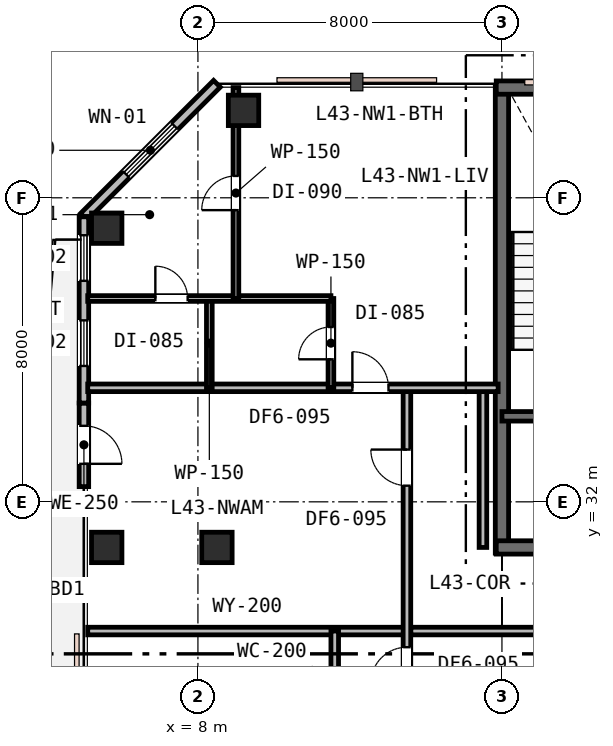
"""IFC4 building model, lengths in metres.
Left out: names, types, materials, properties, quantities, classifications, styles, units other than length and angle.
Written with IfcOpenShell. Run it as: python <this file> out.ifc"""

import sys

from ifc_helpers import new_model, si_unit, direction, frame, frame_2d, origin, origin_2d, place, context, subcontext, project, spatial, rectangle, extrude, element, fill, save


model = new_model("IFC4")
c1 = context("Model", 3, precision=1e-05, world=origin(), true_north=direction((0.0, 1.0)))
c2 = subcontext(c1, "Body", "Model", "MODEL_VIEW")
j1 = project(units=[si_unit("LENGTHUNIT", "METRE"), si_unit("PLANEANGLEUNIT", "RADIAN")], contexts=[c1])
p1 = place(None, origin())
s1 = spatial("IfcSite", under=j1, at=p1, CompositionType="ELEMENT")
p2 = place(p1, origin())
s2 = spatial("IfcBuilding", under=s1, at=p2, CompositionType="ELEMENT")
p3 = place(p2, frame((0.0, 0.0, 168.6)))
s3 = spatial("IfcBuildingStorey", under=s2, at=p3, CompositionType="ELEMENT", Elevation=168.6)
p4 = place(p3, frame((16.0, 30.65, 0.0), z_axis=(0.0, 0.0, 1.0), x_axis=(0.0, 1.0, 0.0)))
e1 = element("IfcWall", 1, at=p4, inside=s3, PredefinedType="SHEAR", context=c2, shape_type="SweptSolid", body=[
    extrude(rectangle(XDim=12.3, YDim=0.35, at=frame_2d((6.15, 0.0))), origin(), (0.0, 0.0, 1.0), 3.6),
])
p5 = place(p3, frame((15.85, 42.9, 0.0), z_axis=(0.0, 0.0, 1.0), x_axis=(1.0, 0.0, 0.0)))
e2 = element("IfcWall", 2, at=p5, inside=s3, PredefinedType="SHEAR", context=c2, shape_type="SweptSolid", body=[
    extrude(rectangle(XDim=24.3, YDim=0.35, at=frame_2d((12.15, 0.0))), origin(), (0.0, 0.0, 1.0), 3.6),
])
p6 = place(p5, frame((1.6, 0.0, 0.95)))
e3 = element("IfcOpeningElement", 3, at=p6, cuts=e2, PredefinedType="OPENING", context=c2, shape_type="SweptSolid", body=[
    extrude(rectangle(XDim=1.2, YDim=1.6, at=frame_2d((0.6, 0.8))), frame((0.0, 0.185, 0.0), z_axis=(0.0, -1.0, 0.0), x_axis=(1.0, 0.0, 0.0)), (0.0, 0.0, 1.0), 0.37),
])
p7 = place(p5, frame((16.5, 0.0, 0.95)))
e4 = element("IfcOpeningElement", 4, at=p7, cuts=e2, PredefinedType="OPENING", context=c2, shape_type="SweptSolid", body=[
    extrude(rectangle(XDim=1.2, YDim=1.6, at=frame_2d((0.6, 0.8))), frame((0.0, 0.185, 0.0), z_axis=(0.0, -1.0, 0.0), x_axis=(1.0, 0.0, 0.0)), (0.0, 0.0, 1.0), 0.37),
])
p8 = place(p5, frame((21.6, 0.0, 0.95)))
e5 = element("IfcOpeningElement", 5, at=p8, cuts=e2, PredefinedType="OPENING", context=c2, shape_type="SweptSolid", body=[
    extrude(rectangle(XDim=1.2, YDim=1.6, at=frame_2d((0.6, 0.8))), frame((0.0, 0.185, 0.0), z_axis=(0.0, -1.0, 0.0), x_axis=(1.0, 0.0, 0.0)), (0.0, 0.0, 1.0), 0.37),
])
p9 = place(p3, frame((15.85, 30.8, 0.0), z_axis=(0.0, 0.0, 1.0), x_axis=(1.0, 0.0, 0.0)))
e6 = element("IfcWall", 6, at=p9, inside=s3, PredefinedType="SHEAR", context=c2, shape_type="SweptSolid", body=[
    extrude(rectangle(XDim=11.2, YDim=0.35, at=frame_2d((5.6, 0.0))), origin(), (0.0, 0.0, 1.0), 3.6),
])
p10 = place(p9, frame((2.45, 0.0, 0.0)))
e7 = element("IfcOpeningElement", 7, at=p10, cuts=e6, PredefinedType="OPENING", context=c2, shape_type="SweptSolid", body=[
    extrude(rectangle(XDim=1.1, YDim=2.15, at=frame_2d((0.55, 1.075))), frame((0.0, 0.185, 0.0), z_axis=(0.0, -1.0, 0.0), x_axis=(1.0, 0.0, 0.0)), (0.0, 0.0, 1.0), 0.37),
])
p11 = place(p3, frame((16.0, 34.25, 0.0), z_axis=(0.0, 0.0, 1.0), x_axis=(1.0, 0.0, 0.0)))
e8 = element("IfcWall", 8, at=p11, inside=s3, PredefinedType="SHEAR", context=c2, shape_type="SweptSolid", body=[
    extrude(rectangle(XDim=6.05, YDim=0.25, at=frame_2d((3.025, 0.0))), origin(), (0.0, 0.0, 1.0), 3.6),
])
p12 = place(p11, frame((1.25, 0.0, 0.0)))
e9 = element("IfcOpeningElement", 9, at=p12, cuts=e8, PredefinedType="OPENING", context=c2, shape_type="SweptSolid", body=[
    extrude(rectangle(XDim=1.0, YDim=2.15, at=frame_2d((0.5, 1.075))), frame((0.0, 0.135, 0.0), z_axis=(0.0, -1.0, 0.0), x_axis=(1.0, 0.0, 0.0)), (0.0, 0.0, 1.0), 0.27),
])
p13 = place(p11, frame((4.2, 0.0, 0.0)))
e10 = element("IfcOpeningElement", 10, at=p13, cuts=e8, PredefinedType="OPENING", context=c2, shape_type="SweptSolid", body=[
    extrude(rectangle(XDim=1.1, YDim=2.15, at=frame_2d((0.55, 1.075))), frame((0.0, 0.135, 0.0), z_axis=(0.0, -1.0, 0.0), x_axis=(1.0, 0.0, 0.0)), (0.0, 0.0, 1.0), 0.27),
])
for number, where, z_axis, x_axis in (
    (11, (5.6, 30.8, 0.0), (0.0, 0.0, 1.0), (1.0, 0.0, 0.0)),
    (12, (5.6, 39.2, 0.0), (0.0, 0.0, 1.0), (1.0, 0.0, 0.0)),
    (13, (8.5, 30.8, 0.0), (0.0, 0.0, 1.0), (1.0, 0.0, 0.0)),
    (14, (9.2, 42.3, 0.0), (0.0, 0.0, 1.0), (1.0, 0.0, 0.0)),
):
    element("IfcColumn", number, at=place(p3, frame(where, z_axis=z_axis, x_axis=x_axis)), inside=s3, PredefinedType="COLUMN", context=c2, shape_type="SweptSolid", body=[
        extrude(rectangle(XDim=0.8, YDim=0.8, at=origin_2d()), origin(), (0.0, 0.0, 1.0), 3.6),
    ])
p14 = place(p3, frame((8.5, 43.0, 0.0), z_axis=(0.0, 0.0, 1.0), x_axis=(-0.707106781187, -0.707106781187, 0.0)))
e15 = element("IfcWall", 15, at=p14, inside=s3, PredefinedType="STANDARD", context=c2, shape_type="SweptSolid", body=[
    extrude(rectangle(XDim=4.95, YDim=0.25, at=frame_2d((2.475, 0.0))), origin(), (0.0, 0.0, 1.0), 3.33),
])
p15 = place(p14, frame((1.575, 0.0, 0.75)))
e16 = element("IfcOpeningElement", 16, at=p15, cuts=e15, PredefinedType="OPENING", context=c2, shape_type="SweptSolid", body=[
    extrude(rectangle(XDim=1.8, YDim=1.85, at=frame_2d((0.9, 0.925))), frame((0.0, 0.135, 0.0), z_axis=(0.0, -1.0, 0.0), x_axis=(1.0, 0.0, 0.0)), (0.0, 0.0, 1.0), 0.27),
])
p16 = place(p3, frame((5.0, 34.6, 0.0), z_axis=(0.0, 0.0, 1.0), x_axis=(0.0, -1.0, 0.0)))
e17 = element("IfcWall", 17, at=p16, inside=s3, PredefinedType="STANDARD", context=c2, shape_type="SweptSolid", body=[
    extrude(rectangle(XDim=2.2, YDim=0.25, at=frame_2d((1.1, 0.0))), origin(), (0.0, 0.0, 1.0), 3.33),
])
p17 = place(p16, frame((0.6, 0.0, 0.0)))
e18 = element("IfcOpeningElement", 18, at=p17, cuts=e17, PredefinedType="OPENING", context=c2, shape_type="SweptSolid", body=[
    extrude(rectangle(XDim=1.0, YDim=2.15, at=frame_2d((0.5, 1.075))), frame((0.0, 0.135, 0.0), z_axis=(0.0, -1.0, 0.0), x_axis=(1.0, 0.0, 0.0)), (0.0, 0.0, 1.0), 0.27),
])
p18 = place(p3, frame((5.0, 39.5, 0.0), z_axis=(0.0, 0.0, 1.0), x_axis=(0.0, -1.0, 0.0)))
e19 = element("IfcWall", 19, at=p18, inside=s3, PredefinedType="STANDARD", context=c2, shape_type="SweptSolid", body=[
    extrude(rectangle(XDim=4.9, YDim=0.25, at=frame_2d((2.45, 0.0))), origin(), (0.0, 0.0, 1.0), 3.33),
])
p19 = place(p18, frame((0.485, 0.0, 0.85)))
e20 = element("IfcOpeningElement", 20, at=p19, cuts=e19, PredefinedType="OPENING", context=c2, shape_type="SweptSolid", body=[
    extrude(rectangle(XDim=1.2, YDim=1.6, at=frame_2d((0.6, 0.8))), frame((0.0, 0.135, 0.0), z_axis=(0.0, -1.0, 0.0), x_axis=(1.0, 0.0, 0.0)), (0.0, 0.0, 1.0), 0.27),
])
p20 = place(p18, frame((2.725, 0.0, 0.85)))
e21 = element("IfcOpeningElement", 21, at=p20, cuts=e19, PredefinedType="OPENING", context=c2, shape_type="SweptSolid", body=[
    extrude(rectangle(XDim=1.2, YDim=1.6, at=frame_2d((0.6, 0.8))), frame((0.0, 0.135, 0.0), z_axis=(0.0, -1.0, 0.0), x_axis=(1.0, 0.0, 0.0)), (0.0, 0.0, 1.0), 0.27),
])
p21 = place(p3, frame((5.1, 28.6, 0.0), z_axis=(0.0, 0.0, 1.0), x_axis=(1.0, 0.0, 0.0)))
e22 = element("IfcWall", 22, at=p21, inside=s3, PredefinedType="PARTITIONING", context=c2, shape_type="SweptSolid", body=[
    extrude(rectangle(XDim=8.4, YDim=0.2, at=frame_2d((4.2, 0.0))), origin(), (0.0, 0.0, 1.0), 2.92),
])
p22 = place(p3, frame((13.6, 28.6, 0.0), z_axis=(0.0, 0.0, 1.0), x_axis=(1.0, 0.0, 0.0)))
e23 = element("IfcWall", 23, at=p22, inside=s3, PredefinedType="PARTITIONING", context=c2, shape_type="SweptSolid", body=[
    extrude(rectangle(XDim=37.3, YDim=0.2, at=frame_2d((18.65, 0.0))), origin(), (0.0, 0.0, 1.0), 2.92),
])
p23 = place(p22, frame((16.025, 0.0, 0.0)))
e24 = element("IfcOpeningElement", 24, at=p23, cuts=e23, PredefinedType="OPENING", context=c2, shape_type="SweptSolid", body=[
    extrude(rectangle(XDim=0.95, YDim=2.15, at=frame_2d((0.475, 1.075))), frame((0.0, 0.11, 0.0), z_axis=(0.0, -1.0, 0.0), x_axis=(1.0, 0.0, 0.0)), (0.0, 0.0, 1.0), 0.22),
])
p24 = place(p22, frame((25.925, 0.0, 0.0)))
e25 = element("IfcOpeningElement", 25, at=p24, cuts=e23, PredefinedType="OPENING", context=c2, shape_type="SweptSolid", body=[
    extrude(rectangle(XDim=0.95, YDim=2.15, at=frame_2d((0.475, 1.075))), frame((0.0, 0.11, 0.0), z_axis=(0.0, -1.0, 0.0), x_axis=(1.0, 0.0, 0.0)), (0.0, 0.0, 1.0), 0.22),
])
p25 = place(p3, frame((15.5, 30.8, 0.0), z_axis=(0.0, 0.0, 1.0), x_axis=(0.0, 1.0, 0.0)))
e26 = element("IfcWall", 26, at=p25, inside=s3, PredefinedType="PARTITIONING", context=c2, shape_type="SweptSolid", body=[
    extrude(rectangle(XDim=4.2, YDim=0.2, at=frame_2d((2.1, 0.0))), origin(), (0.0, 0.0, 1.0), 2.92),
])
p26 = place(p3, frame((13.5, 17.0, 0.0), z_axis=(0.0, 0.0, 1.0), x_axis=(0.0, 1.0, 0.0)))
e27 = element("IfcWall", 27, at=p26, inside=s3, PredefinedType="PARTITIONING", context=c2, shape_type="SweptSolid", body=[
    extrude(rectangle(XDim=18.0, YDim=0.2, at=frame_2d((9.0, 0.0))), origin(), (0.0, 0.0, 1.0), 2.92),
])
p27 = place(p26, frame((15.425, 0.0, 0.0)))
e28 = element("IfcOpeningElement", 28, at=p27, cuts=e27, PredefinedType="OPENING", context=c2, shape_type="SweptSolid", body=[
    extrude(rectangle(XDim=0.95, YDim=2.15, at=frame_2d((0.475, 1.075))), frame((0.0, 0.11, 0.0), z_axis=(0.0, -1.0, 0.0), x_axis=(1.0, 0.0, 0.0)), (0.0, 0.0, 1.0), 0.22),
])
p28 = place(p26, frame((10.225, 0.0, 0.0)))
e29 = element("IfcOpeningElement", 29, at=p28, cuts=e27, PredefinedType="OPENING", context=c2, shape_type="SweptSolid", body=[
    extrude(rectangle(XDim=0.95, YDim=2.15, at=frame_2d((0.475, 1.075))), frame((0.0, 0.11, 0.0), z_axis=(0.0, -1.0, 0.0), x_axis=(1.0, 0.0, 0.0)), (0.0, 0.0, 1.0), 0.22),
])
p29 = place(p3, frame((5.1, 35.0, 0.0), z_axis=(0.0, 0.0, 1.0), x_axis=(1.0, 0.0, 0.0)))
e30 = element("IfcWall", 30, at=p29, inside=s3, PredefinedType="PARTITIONING", context=c2, shape_type="SweptSolid", body=[
    extrude(rectangle(XDim=10.8, YDim=0.2, at=frame_2d((5.4, 0.0))), origin(), (0.0, 0.0, 1.0), 3.02),
])
p30 = place(p29, frame((6.964, 0.0, 0.0)))
e31 = element("IfcOpeningElement", 31, at=p30, cuts=e30, PredefinedType="OPENING", context=c2, shape_type="SweptSolid", body=[
    extrude(rectangle(XDim=0.95, YDim=2.15, at=frame_2d((0.475, 1.075))), frame((0.0, 0.11, 0.0), z_axis=(0.0, -1.0, 0.0), x_axis=(1.0, 0.0, 0.0)), (0.0, 0.0, 1.0), 0.22),
])
p31 = place(p3, frame((11.5, 35.0, 0.0), z_axis=(0.0, 0.0, 1.0), x_axis=(0.0, 1.0, 0.0)))
e32 = element("IfcWall", 32, at=p31, inside=s3, PredefinedType="PARTITIONING", context=c2, shape_type="SweptSolid", body=[
    extrude(rectangle(XDim=2.35, YDim=0.15, at=frame_2d((1.175, 0.0))), origin(), (0.0, 0.0, 1.0), 3.33),
])
p32 = place(p31, frame((0.75, 0.0, 0.0)))
e33 = element("IfcOpeningElement", 33, at=p32, cuts=e32, PredefinedType="OPENING", context=c2, shape_type="SweptSolid", body=[
    extrude(rectangle(XDim=0.85, YDim=2.15, at=frame_2d((0.425, 1.075))), frame((0.0, 0.085, 0.0), z_axis=(0.0, -1.0, 0.0), x_axis=(1.0, 0.0, 0.0)), (0.0, 0.0, 1.0), 0.17),
])
p33 = place(p3, frame((8.3, 35.0, 0.0), z_axis=(0.0, 0.0, 1.0), x_axis=(0.0, 1.0, 0.0)))
e34 = element("IfcWall", 34, at=p33, inside=s3, PredefinedType="PARTITIONING", context=c2, shape_type="SweptSolid", body=[
    extrude(rectangle(XDim=2.35, YDim=0.15, at=frame_2d((1.175, 0.0))), origin(), (0.0, 0.0, 1.0), 3.33),
])
p34 = place(p3, frame((5.1, 37.35, 0.0), z_axis=(0.0, 0.0, 1.0), x_axis=(1.0, 0.0, 0.0)))
e35 = element("IfcWall", 35, at=p34, inside=s3, PredefinedType="PARTITIONING", context=c2, shape_type="SweptSolid", body=[
    extrude(rectangle(XDim=6.4, YDim=0.15, at=frame_2d((3.2, 0.0))), origin(), (0.0, 0.0, 1.0), 3.02),
])
p35 = place(p34, frame((1.78, 0.0, 0.0)))
e36 = element("IfcOpeningElement", 36, at=p35, cuts=e35, PredefinedType="OPENING", context=c2, shape_type="SweptSolid", body=[
    extrude(rectangle(XDim=0.85, YDim=2.15, at=frame_2d((0.425, 1.075))), frame((0.0, 0.085, 0.0), z_axis=(0.0, -1.0, 0.0), x_axis=(1.0, 0.0, 0.0)), (0.0, 0.0, 1.0), 0.17),
])
p36 = place(p3, frame((9.0, 37.35, 0.0), z_axis=(0.0, 0.0, 1.0), x_axis=(0.0, 1.0, 0.0)))
e37 = element("IfcWall", 37, at=p36, inside=s3, PredefinedType="PARTITIONING", context=c2, shape_type="SweptSolid", body=[
    extrude(rectangle(XDim=5.55, YDim=0.15, at=frame_2d((2.775, 0.0))), origin(), (0.0, 0.0, 1.0), 3.02),
])
p37 = place(p36, frame((2.325, 0.0, 0.0)))
e38 = element("IfcOpeningElement", 38, at=p37, cuts=e37, PredefinedType="OPENING", context=c2, shape_type="SweptSolid", body=[
    extrude(rectangle(XDim=0.9, YDim=2.15, at=frame_2d((0.45, 1.075))), frame((0.0, 0.085, 0.0), z_axis=(0.0, -1.0, 0.0), x_axis=(1.0, 0.0, 0.0)), (0.0, 0.0, 1.0), 0.17),
])
p38 = place(p3, frame((11.6, 17.0, 0.0), z_axis=(0.0, 0.0, 1.0), x_axis=(0.0, 1.0, 0.0)))
e39 = element("IfcWall", 39, at=p38, inside=s3, PredefinedType="PARTITIONING", context=c2, shape_type="SweptSolid", body=[
    extrude(rectangle(XDim=11.6, YDim=0.2, at=frame_2d((5.8, 0.0))), origin(), (0.0, 0.0, 1.0), 2.92),
])
p39 = place(p38, frame((0.723, 0.0, 0.0)))
e40 = element("IfcOpeningElement", 40, at=p39, cuts=e39, PredefinedType="OPENING", context=c2, shape_type="SweptSolid", body=[
    extrude(rectangle(XDim=0.95, YDim=2.15, at=frame_2d((0.475, 1.075))), frame((0.0, 0.11, 0.0), z_axis=(0.0, -1.0, 0.0), x_axis=(1.0, 0.0, 0.0)), (0.0, 0.0, 1.0), 0.22),
])
p40 = place(p15, origin())
e41 = element("IfcWindow", 41, at=p40, inside=s3, PartitioningType="SINGLE_PANEL", PredefinedType="WINDOW", context=c2, shape_type="SweptSolid", body=[
    extrude(rectangle(XDim=1.8, YDim=1.85, at=frame_2d((0.9, 0.925))), frame((0.0, 0.03, 0.0), z_axis=(0.0, -1.0, 0.0), x_axis=(1.0, 0.0, 0.0)), (0.0, 0.0, 1.0), 0.06),
])
fill(e16, e41)
p41 = place(p17, origin())
e42 = element("IfcDoor", 42, at=p41, inside=s3, OperationType="SINGLE_SWING_RIGHT", PredefinedType="DOOR", context=c2, shape_type="SweptSolid", body=[
    extrude(rectangle(XDim=1.0, YDim=2.15, at=frame_2d((0.5, 1.075))), frame((0.0, 0.025, 0.0), z_axis=(0.0, -1.0, 0.0), x_axis=(1.0, 0.0, 0.0)), (0.0, 0.0, 1.0), 0.05),
])
fill(e18, e42)
p42 = place(p19, origin())
e43 = element("IfcWindow", 43, at=p42, inside=s3, PartitioningType="SINGLE_PANEL", PredefinedType="WINDOW", context=c2, shape_type="SweptSolid", body=[
    extrude(rectangle(XDim=1.2, YDim=1.6, at=frame_2d((0.6, 0.8))), frame((0.0, 0.03, 0.0), z_axis=(0.0, -1.0, 0.0), x_axis=(1.0, 0.0, 0.0)), (0.0, 0.0, 1.0), 0.06),
])
fill(e20, e43)
p43 = place(p20, origin())
e44 = element("IfcWindow", 44, at=p43, inside=s3, PartitioningType="SINGLE_PANEL", PredefinedType="WINDOW", context=c2, shape_type="SweptSolid", body=[
    extrude(rectangle(XDim=1.2, YDim=1.6, at=frame_2d((0.6, 0.8))), frame((0.0, 0.03, 0.0), z_axis=(0.0, -1.0, 0.0), x_axis=(1.0, 0.0, 0.0)), (0.0, 0.0, 1.0), 0.06),
])
fill(e21, e44)
p44 = place(p27, origin())
e45 = element("IfcDoor", 45, at=p44, inside=s3, OperationType="SINGLE_SWING_RIGHT", PredefinedType="DOOR", context=c2, shape_type="SweptSolid", body=[
    extrude(rectangle(XDim=0.95, YDim=2.15, at=frame_2d((0.475, 1.075))), frame((0.0, 0.025, 0.0), z_axis=(0.0, -1.0, 0.0), x_axis=(1.0, 0.0, 0.0)), (0.0, 0.0, 1.0), 0.05),
])
fill(e28, e45)
p45 = place(p30, origin())
e46 = element("IfcDoor", 46, at=p45, inside=s3, OperationType="SINGLE_SWING_LEFT", PredefinedType="DOOR", context=c2, shape_type="SweptSolid", body=[
    extrude(rectangle(XDim=0.95, YDim=2.15, at=frame_2d((0.475, 1.075))), frame((0.0, 0.025, 0.0), z_axis=(0.0, -1.0, 0.0), x_axis=(1.0, 0.0, 0.0)), (0.0, 0.0, 1.0), 0.05),
])
fill(e31, e46)
p46 = place(p32, origin())
e47 = element("IfcDoor", 47, at=p46, inside=s3, OperationType="SINGLE_SWING_LEFT", PredefinedType="DOOR", context=c2, shape_type="SweptSolid", body=[
    extrude(rectangle(XDim=0.85, YDim=2.15, at=frame_2d((0.425, 1.075))), frame((0.0, 0.025, 0.0), z_axis=(0.0, -1.0, 0.0), x_axis=(1.0, 0.0, 0.0)), (0.0, 0.0, 1.0), 0.05),
])
fill(e33, e47)
p47 = place(p35, origin())
e48 = element("IfcDoor", 48, at=p47, inside=s3, OperationType="SINGLE_SWING_LEFT", PredefinedType="DOOR", context=c2, shape_type="SweptSolid", body=[
    extrude(rectangle(XDim=0.85, YDim=2.15, at=frame_2d((0.425, 1.075))), frame((0.0, 0.025, 0.0), z_axis=(0.0, -1.0, 0.0), x_axis=(1.0, 0.0, 0.0)), (0.0, 0.0, 1.0), 0.05),
])
fill(e36, e48)
p48 = place(p37, origin())
e49 = element("IfcDoor", 49, at=p48, inside=s3, OperationType="SINGLE_SWING_LEFT", PredefinedType="DOOR", context=c2, shape_type="SweptSolid", body=[
    extrude(rectangle(XDim=0.9, YDim=2.15, at=frame_2d((0.45, 1.075))), frame((0.0, 0.025, 0.0), z_axis=(0.0, -1.0, 0.0), x_axis=(1.0, 0.0, 0.0)), (0.0, 0.0, 1.0), 0.05),
])
fill(e38, e49)
p49 = place(p28, origin())
e50 = element("IfcDoor", 50, at=p49, inside=s3, OperationType="SINGLE_SWING_LEFT", PredefinedType="DOOR", context=c2, shape_type="SweptSolid", body=[
    extrude(rectangle(XDim=0.95, YDim=2.15, at=frame_2d((0.475, 1.075))), frame((0.0, 0.025, 0.0), z_axis=(0.0, -1.0, 0.0), x_axis=(1.0, 0.0, 0.0)), (0.0, 0.0, 1.0), 0.05),
])
fill(e29, e50)
save(model, sys.argv[1])
